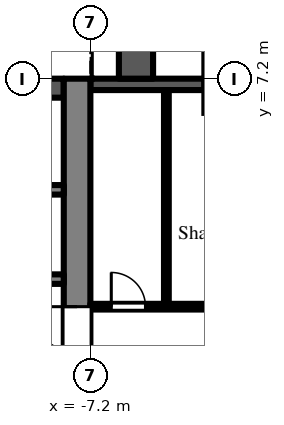
"""IFC4 building model, lengths in metres.
Left out: names, types, materials, properties, quantities, classifications, styles, units other than length and angle.
Written with IfcOpenShell. Run it as: python <this file> out.ifc"""

import sys

from ifc_helpers import new_model, si_unit, direction, frame, frame_2d, origin, place, context, subcontext, project, spatial, rectangle, extrude, element, fill, save


model = new_model("IFC4")
c1 = context("Model", 3, precision=1e-05, world=origin(), true_north=direction((0.0, 1.0)))
c2 = subcontext(c1, "Body", "Model", "MODEL_VIEW")
j1 = project(units=[si_unit("LENGTHUNIT", "METRE"), si_unit("PLANEANGLEUNIT", "RADIAN")], contexts=[c1])
p1 = place(None, origin())
s1 = spatial("IfcSite", under=j1, at=p1, CompositionType="ELEMENT")
p2 = place(p1, origin())
s2 = spatial("IfcBuilding", under=s1, at=p2, CompositionType="ELEMENT")
p3 = place(p2, frame((0.0, 0.0, 75.9)))
s3 = spatial("IfcBuildingStorey", under=s2, at=p3, CompositionType="ELEMENT", Elevation=75.9)
p4 = place(p3, frame((-4.05, 14.4, 0.0), z_axis=(0.0, 0.0, 1.0), x_axis=(0.0, -1.0, 0.0)))
e1 = element("IfcWall", 1, at=p4, inside=s3, PredefinedType="SOLIDWALL", context=c2, shape_type="SweptSolid", body=[
    extrude(rectangle(XDim=7.2, YDim=0.3, at=frame_2d((3.6, 0.0))), origin(), (0.0, 0.0, 1.0), 2.1),
])
p5 = place(p4, frame((3.0, 0.0, 0.0)))
e2 = element("IfcOpeningElement", 2, at=p5, cuts=e1, PredefinedType="OPENING", context=c2, shape_type="SweptSolid", body=[
    extrude(rectangle(XDim=1.2, YDim=2.05, at=frame_2d((0.6, 1.025))), frame((0.0, 0.16, 0.0), z_axis=(0.0, -1.0, 0.0), x_axis=(1.0, 0.0, 0.0)), (0.0, 0.0, 1.0), 0.32),
])
p6 = place(p4, frame((0.9, 0.0, 0.2)))
e3 = element("IfcOpeningElement", 3, at=p6, cuts=e1, PredefinedType="OPENING", context=c2, shape_type="SweptSolid", body=[
    extrude(rectangle(XDim=1.8, YDim=1.85, at=frame_2d((0.9, 0.925))), frame((0.0, 0.16, 0.0), z_axis=(0.0, -1.0, 0.0), x_axis=(1.0, 0.0, 0.0)), (0.0, 0.0, 1.0), 0.32),
])
p7 = place(p4, frame((4.5, 0.0, 0.2)))
e4 = element("IfcOpeningElement", 4, at=p7, cuts=e1, PredefinedType="OPENING", context=c2, shape_type="SweptSolid", body=[
    extrude(rectangle(XDim=1.8, YDim=1.85, at=frame_2d((0.9, 0.925))), frame((0.0, 0.16, 0.0), z_axis=(0.0, -1.0, 0.0), x_axis=(1.0, 0.0, 0.0)), (0.0, 0.0, 1.0), 0.32),
])
p8 = place(p3, frame((-4.2, 7.05, 0.0), z_axis=(0.0, 0.0, 1.0), x_axis=(-1.0, 0.0, 0.0)))
e5 = element("IfcWall", 5, at=p8, inside=s3, PredefinedType="SOLIDWALL", context=c2, shape_type="SweptSolid", body=[
    extrude(rectangle(XDim=3.0, YDim=0.3, at=frame_2d((1.5, 0.0))), origin(), (0.0, 0.0, 1.0), 2.1),
])
p9 = place(p3, frame((-6.0, 7.2, 0.0), z_axis=(0.0, 0.0, 1.0), x_axis=(0.0, 1.0, 0.0)))
e6 = element("IfcWall", 6, at=p9, inside=s3, PredefinedType="PARAPET", context=c2, shape_type="SweptSolid", body=[
    extrude(rectangle(XDim=7.2, YDim=0.9, at=frame_2d((3.6, 0.0))), origin(), (0.0, 0.0, 1.0), 0.8),
])
p10 = place(p3, frame((-7.55, -7.2, 0.0), z_axis=(0.0, 0.0, 1.0), x_axis=(0.0, 1.0, 0.0)))
e7 = element("IfcWall", 7, at=p10, inside=s3, PredefinedType="SHEAR", context=c2, shape_type="SweptSolid", body=[
    extrude(rectangle(XDim=14.4, YDim=0.7, at=frame_2d((7.2, 0.0))), origin(), (0.0, 0.0, 1.0), 2.575),
])
p11 = place(p10, frame((6.0, 0.0, 0.0)))
e8 = element("IfcOpeningElement", 8, at=p11, cuts=e7, PredefinedType="OPENING", context=c2, shape_type="SweptSolid", body=[
    extrude(rectangle(XDim=2.4, YDim=2.2, at=frame_2d((1.2, 1.1))), frame((0.0, 0.36, 0.0), z_axis=(0.0, -1.0, 0.0), x_axis=(1.0, 0.0, 0.0)), (0.0, 0.0, 1.0), 0.72),
])
p12 = place(p3, frame((-7.9, 6.95, 0.0), z_axis=(0.0, 0.0, 1.0), x_axis=(-1.0, 0.0, 0.0)))
e9 = element("IfcWall", 9, at=p12, inside=s3, PredefinedType="SHEAR", context=c2, shape_type="SweptSolid", body=[
    extrude(rectangle(XDim=12.95, YDim=0.5, at=frame_2d((6.475, 0.0))), origin(), (0.0, 0.0, 1.0), 2.575),
])
p13 = place(p3, frame((-7.9, 1.925, 0.0), z_axis=(0.0, 0.0, 1.0), x_axis=(-1.0, 0.0, 0.0)))
e10 = element("IfcWall", 10, at=p13, inside=s3, PredefinedType="SHEAR", context=c2, shape_type="SweptSolid", body=[
    extrude(rectangle(XDim=12.95, YDim=0.25, at=frame_2d((6.475, 0.0))), origin(), (0.0, 0.0, 1.0), 2.575),
])
p14 = place(p13, frame((0.525, 0.0, 0.0)))
e11 = element("IfcOpeningElement", 11, at=p14, cuts=e10, PredefinedType="OPENING", context=c2, shape_type="SweptSolid", body=[
    extrude(rectangle(XDim=0.9, YDim=2.1, at=frame_2d((0.45, 1.05))), frame((0.0, 0.135, 0.0), z_axis=(0.0, -1.0, 0.0), x_axis=(1.0, 0.0, 0.0)), (0.0, 0.0, 1.0), 0.27),
])
p15 = place(p13, frame((2.625, 0.0, 0.0)))
e12 = element("IfcOpeningElement", 12, at=p15, cuts=e10, PredefinedType="OPENING", context=c2, shape_type="SweptSolid", body=[
    extrude(rectangle(XDim=1.1, YDim=2.1, at=frame_2d((0.55, 1.05))), frame((0.0, 0.135, 0.0), z_axis=(0.0, -1.0, 0.0), x_axis=(1.0, 0.0, 0.0)), (0.0, 0.0, 1.0), 0.27),
])
p16 = place(p13, frame((4.925, 0.0, 0.0)))
e13 = element("IfcOpeningElement", 13, at=p16, cuts=e10, PredefinedType="OPENING", context=c2, shape_type="SweptSolid", body=[
    extrude(rectangle(XDim=0.9, YDim=2.1, at=frame_2d((0.45, 1.05))), frame((0.0, 0.135, 0.0), z_axis=(0.0, -1.0, 0.0), x_axis=(1.0, 0.0, 0.0)), (0.0, 0.0, 1.0), 0.27),
])
p17 = place(p13, frame((8.225, 0.0, 0.0)))
e14 = element("IfcOpeningElement", 14, at=p17, cuts=e10, PredefinedType="OPENING", context=c2, shape_type="SweptSolid", body=[
    extrude(rectangle(XDim=0.9, YDim=2.1, at=frame_2d((0.45, 1.05))), frame((0.0, 0.135, 0.0), z_axis=(0.0, -1.0, 0.0), x_axis=(1.0, 0.0, 0.0)), (0.0, 0.0, 1.0), 0.27),
])
p18 = place(p3, frame((-7.9, 4.275, 0.0), z_axis=(0.0, 0.0, 1.0), x_axis=(-1.0, 0.0, 0.0)))
e15 = element("IfcWall", 15, at=p18, inside=s3, PredefinedType="SHEAR", context=c2, shape_type="SweptSolid", body=[
    extrude(rectangle(XDim=1.95, YDim=0.25, at=frame_2d((0.975, 0.0))), origin(), (0.0, 0.0, 1.0), 2.575),
])
p19 = place(p3, frame((-7.2, 1.2, 0.0), z_axis=(0.0, 0.0, 1.0), x_axis=(1.0, 0.0, 0.0)))
e16 = element("IfcWall", 16, at=p19, inside=s3, PredefinedType="PARTITIONING", context=c2, shape_type="SweptSolid", body=[
    extrude(rectangle(XDim=6.075, YDim=0.15, at=frame_2d((3.038, 0.0))), origin(), (0.0, 0.0, 1.0), 2.575),
])
p20 = place(p19, frame((0.55, 0.0, 0.0)))
e17 = element("IfcOpeningElement", 17, at=p20, cuts=e16, PredefinedType="OPENING", context=c2, shape_type="SweptSolid", body=[
    extrude(rectangle(XDim=0.9, YDim=2.1, at=frame_2d((0.45, 1.05))), frame((0.0, 0.085, 0.0), z_axis=(0.0, -1.0, 0.0), x_axis=(1.0, 0.0, 0.0)), (0.0, 0.0, 1.0), 0.17),
])
p21 = place(p3, frame((-5.2, 1.275, 0.0), z_axis=(0.0, 0.0, 1.0), x_axis=(0.0, 1.0, 0.0)))
e18 = element("IfcWall", 18, at=p21, inside=s3, PredefinedType="PARTITIONING", context=c2, shape_type="SweptSolid", body=[
    extrude(rectangle(XDim=5.625, YDim=0.125, at=frame_2d((2.812, 0.0))), origin(), (0.0, 0.0, 1.0), 2.575),
])
p22 = place(p11, origin())
e19 = element("IfcDoor", 19, at=p22, inside=s3, OperationType="DOUBLE_DOOR_DOUBLE_SWING", PredefinedType="DOOR", context=c2, shape_type="SweptSolid", body=[
    extrude(rectangle(XDim=2.4, YDim=2.2, at=frame_2d((1.2, 1.1))), frame((0.0, 0.025, 0.0), z_axis=(0.0, -1.0, 0.0), x_axis=(1.0, 0.0, 0.0)), (0.0, 0.0, 1.0), 0.05),
])
fill(e8, e19)
p23 = place(p20, origin())
e20 = element("IfcDoor", 20, at=p23, inside=s3, OperationType="SINGLE_SWING_LEFT", PredefinedType="DOOR", context=c2, shape_type="SweptSolid", body=[
    extrude(rectangle(XDim=0.9, YDim=2.1, at=frame_2d((0.45, 1.05))), frame((0.0, 0.025, 0.0), z_axis=(0.0, -1.0, 0.0), x_axis=(1.0, 0.0, 0.0)), (0.0, 0.0, 1.0), 0.05),
])
fill(e17, e20)
save(model, sys.argv[1])
